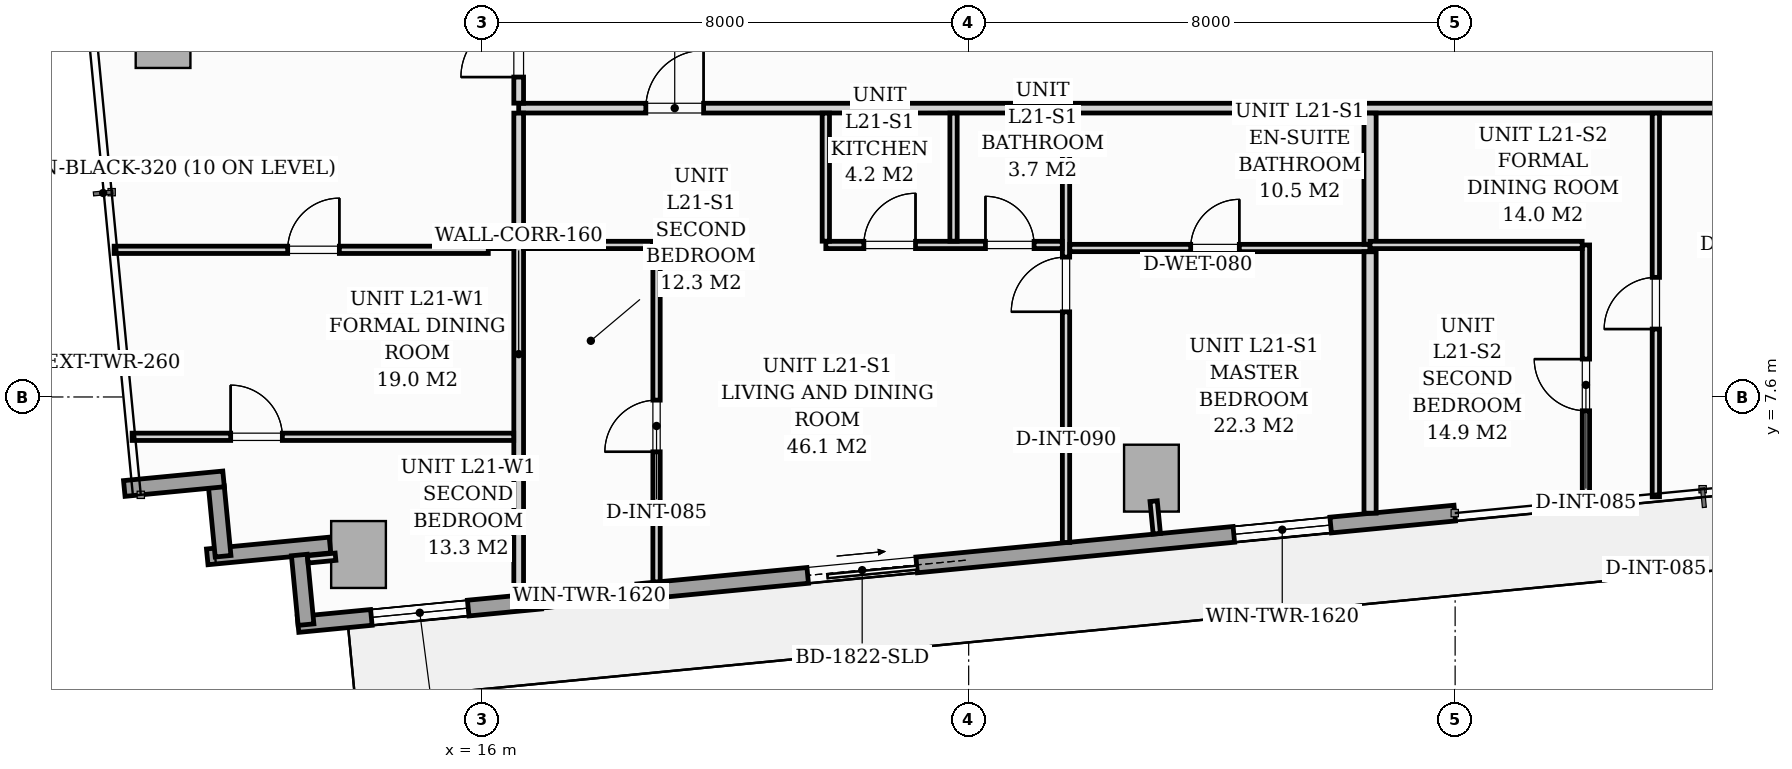
"""IFC4 building model, lengths in metres.
Left out: names, types, materials, properties, quantities, classifications, styles, units other than length and angle.
Written with IfcOpenShell. Run it as: python <this file> out.ifc"""

import sys

from ifc_helpers import new_model, si_unit, direction, frame, frame_2d, origin, origin_2d, place, context, subcontext, project, spatial, rectangle, extrude, source, transform, mapped, element, fill, save


model = new_model("IFC4")
c1 = context("Model", 3, precision=1e-05, world=origin(), true_north=direction((0.0, 1.0)))
c2 = subcontext(c1, "Body", "Model", "MODEL_VIEW")
j1 = project(units=[si_unit("LENGTHUNIT", "METRE"), si_unit("PLANEANGLEUNIT", "RADIAN")], contexts=[c1])
p1 = place(None, origin())
s1 = spatial("IfcSite", under=j1, at=p1, CompositionType="ELEMENT")
p2 = place(p1, origin())
s2 = spatial("IfcBuilding", under=s1, at=p2, CompositionType="ELEMENT")
p3 = place(p2, frame((0.0, 0.0, 77.8)))
s3 = spatial("IfcBuildingStorey", under=s2, at=p3, CompositionType="ELEMENT", Elevation=77.8)
m1 = source(origin(), c2, "Body", "SweptSolid", [
    extrude(rectangle(XDim=0.9, YDim=1.1, at=origin_2d()), origin(), (0.0, 0.0, 1.0), 3.194),
])
for number, where, z_axis, x_axis in (
    (1, (13.966, 5.01, 0.004), (0.0, 0.0, 1.0), (0.995, 0.096, 0.0)),
    (2, (27.006, 6.265, 0.004), (0.0, 0.0, 1.0), (0.995, 0.096, 0.0)),
    (3, (10.752, 13.561, 0.004), (0.0, 0.0, 1.0), (0.995, 0.096, 0.0)),
):
    element("IfcColumn", number, at=place(p3, frame(where, z_axis=z_axis, x_axis=x_axis)), inside=s3, PredefinedType="COLUMN", context=c2, shape_type="MappedRepresentation", body=[
        mapped(m1, transform((0.0, 0.0, 0.0), scale=1.0)),
    ])
p4 = place(p3, frame((13.497, 5.165, 0.0), z_axis=(0.0, 0.0, 1.0), x_axis=(-0.995386060643, -0.095950978511, 0.0)))
e4 = element("IfcWall", 4, at=p4, inside=s3, PredefinedType="STANDARD", context=c2, shape_type="SweptSolid", body=[
    extrude(rectangle(XDim=2.028, YDim=0.26, at=frame_2d((1.014, 0.0))), origin(), (0.0, 0.0, 1.0), 2.94),
])
p5 = place(p3, frame((11.739, 4.981, 0.0), z_axis=(0.0, 0.0, 1.0), x_axis=(-0.09576095695, 0.995404359607, 0.0)))
e5 = element("IfcWall", 5, at=p5, inside=s3, PredefinedType="STANDARD", context=c2, shape_type="SweptSolid", body=[
    extrude(rectangle(XDim=1.15, YDim=0.26, at=frame_2d((0.575, 0.0))), origin(), (0.0, 0.0, 1.0), 2.94),
])
p6 = place(p3, frame((11.747, 6.252, 0.0), z_axis=(0.0, 0.0, 1.0), x_axis=(-0.995394563142, -0.095862733462, 0.0)))
e6 = element("IfcWall", 6, at=p6, inside=s3, PredefinedType="STANDARD", context=c2, shape_type="SweptSolid", body=[
    extrude(rectangle(XDim=1.64, YDim=0.26, at=frame_2d((0.82, 0.0))), origin(), (0.0, 0.0, 1.0), 2.94),
])
p7 = place(p3, frame((31.994, 5.69, 0.0), z_axis=(0.0, 0.0, 1.0), x_axis=(-0.995396521236, -0.095842399342, 0.0)))
e7 = element("IfcWall", 7, at=p7, inside=s3, PredefinedType="STANDARD", context=c2, shape_type="SweptSolid", body=[
    extrude(rectangle(XDim=19.11, YDim=0.26, at=frame_2d((9.555, 0.0))), origin(), (0.0, 0.0, 1.0), 2.94),
])
p8 = place(p7, frame((8.89, 0.0, 0.0)))
e8 = element("IfcOpeningElement", 8, at=p8, cuts=e7, PredefinedType="OPENING", context=c2, shape_type="SweptSolid", body=[
    extrude(rectangle(XDim=1.8, YDim=2.06, at=frame_2d((0.9, 1.03))), frame((0.0, 0.14, 0.0), z_axis=(0.0, -1.0, 0.0), x_axis=(1.0, 0.0, 0.0)), (0.0, 0.0, 1.0), 0.28),
])
p9 = place(p7, frame((2.05, 0.0, 0.65)))
e9 = element("IfcOpeningElement", 9, at=p9, cuts=e7, PredefinedType="OPENING", context=c2, shape_type="SweptSolid", body=[
    extrude(rectangle(XDim=1.6, YDim=1.5, at=frame_2d((0.8, 0.75))), frame((0.0, 0.14, 0.0), z_axis=(0.0, -1.0, 0.0), x_axis=(1.0, 0.0, 0.0)), (0.0, 0.0, 1.0), 0.28),
])
p10 = place(p7, frame((13.499, 0.0, 0.75)))
e10 = element("IfcOpeningElement", 10, at=p10, cuts=e7, PredefinedType="OPENING", context=c2, shape_type="SweptSolid", body=[
    extrude(rectangle(XDim=1.6, YDim=1.5, at=frame_2d((0.8, 0.75))), frame((0.0, 0.14, 0.0), z_axis=(0.0, -1.0, 0.0), x_axis=(1.0, 0.0, 0.0)), (0.0, 0.0, 1.0), 0.28),
])
p11 = place(p7, frame((16.299, 0.0, 0.75)))
e11 = element("IfcOpeningElement", 11, at=p11, cuts=e7, PredefinedType="OPENING", context=c2, shape_type="SweptSolid", body=[
    extrude(rectangle(XDim=1.6, YDim=1.5, at=frame_2d((0.8, 0.75))), frame((0.0, 0.14, 0.0), z_axis=(0.0, -1.0, 0.0), x_axis=(1.0, 0.0, 0.0)), (0.0, 0.0, 1.0), 0.28),
])
p12 = place(p3, frame((13.103, 3.856, 0.0), z_axis=(0.0, 0.0, 1.0), x_axis=(-0.095951054827, 0.995386053287, 0.0)))
e12 = element("IfcWall", 12, at=p12, inside=s3, PredefinedType="STANDARD", context=c2, shape_type="SweptSolid", body=[
    extrude(rectangle(XDim=1.15, YDim=0.26, at=frame_2d((0.575, 0.0))), origin(), (0.0, 0.0, 1.0), 2.94),
])
p13 = place(p3, frame((16.6, 12.35, 0.0), z_axis=(0.0, 0.0, 1.0), x_axis=(1.0, 0.0, 0.0)))
e13 = element("IfcWall", 13, at=p13, inside=s3, PredefinedType="PARTITIONING", context=c2, shape_type="SweptSolid", body=[
    extrude(rectangle(XDim=37.6, YDim=0.16, at=frame_2d((18.8, 0.0))), origin(), (0.0, 0.0, 1.0), 2.94),
])
p14 = place(p13, frame((2.091, 0.0, 0.0)))
e14 = element("IfcOpeningElement", 14, at=p14, cuts=e13, PredefinedType="OPENING", context=c2, shape_type="SweptSolid", body=[
    extrude(rectangle(XDim=0.95, YDim=2.06, at=frame_2d((0.475, 1.03))), frame((0.0, 0.09, 0.0), z_axis=(0.0, -1.0, 0.0), x_axis=(1.0, 0.0, 0.0)), (0.0, 0.0, 1.0), 0.18),
])
p15 = place(p13, frame((26.146, 0.0, 0.0)))
e15 = element("IfcOpeningElement", 15, at=p15, cuts=e13, PredefinedType="OPENING", context=c2, shape_type="SweptSolid", body=[
    extrude(rectangle(XDim=0.95, YDim=2.06, at=frame_2d((0.475, 1.03))), frame((0.0, 0.09, 0.0), z_axis=(0.0, -1.0, 0.0), x_axis=(1.0, 0.0, 0.0)), (0.0, 0.0, 1.0), 0.18),
])
p16 = place(p3, frame((16.6, 4.341, 0.0), z_axis=(0.0, 0.0, 1.0), x_axis=(0.0, 1.0, 0.0)))
e16 = element("IfcWall", 16, at=p16, inside=s3, PredefinedType="PARTITIONING", context=c2, shape_type="SweptSolid", body=[
    extrude(rectangle(XDim=7.927, YDim=0.16, at=frame_2d((3.964, 0.0))), origin(), (0.0, 0.0, 1.0), 2.94),
])
p17 = place(p3, frame((16.6, 12.432, 0.0), z_axis=(0.0, 0.0, 1.0), x_axis=(0.0, 1.0, 0.0)))
e17 = element("IfcWall", 17, at=p17, inside=s3, PredefinedType="PARTITIONING", context=c2, shape_type="SweptSolid", body=[
    extrude(rectangle(XDim=11.475, YDim=0.16, at=frame_2d((5.738, 0.0))), origin(), (0.0, 0.0, 1.0), 2.94),
])
p18 = place(p17, frame((0.429, 0.0, 0.0)))
e18 = element("IfcOpeningElement", 18, at=p18, cuts=e17, PredefinedType="OPENING", context=c2, shape_type="SweptSolid", body=[
    extrude(rectangle(XDim=0.95, YDim=2.06, at=frame_2d((0.475, 1.03))), frame((0.0, 0.09, 0.0), z_axis=(0.0, -1.0, 0.0), x_axis=(1.0, 0.0, 0.0)), (0.0, 0.0, 1.0), 0.18),
])
p19 = place(p3, frame((25.601, 5.208, 0.0), z_axis=(0.0, 0.0, 1.0), x_axis=(0.0, 1.0, 0.0)))
e19 = element("IfcWall", 19, at=p19, inside=s3, PredefinedType="PARTITIONING", context=c2, shape_type="SweptSolid", body=[
    extrude(rectangle(XDim=7.061, YDim=0.12, at=frame_2d((3.53, 0.0))), origin(), (0.0, 0.0, 1.0), 2.94),
])
p20 = place(p19, frame((3.792, 0.0, 0.0)))
e20 = element("IfcOpeningElement", 20, at=p20, cuts=e19, PredefinedType="OPENING", context=c2, shape_type="SweptSolid", body=[
    extrude(rectangle(XDim=0.9, YDim=2.05, at=frame_2d((0.45, 1.025))), frame((0.0, 0.07, 0.0), z_axis=(0.0, -1.0, 0.0), x_axis=(1.0, 0.0, 0.0)), (0.0, 0.0, 1.0), 0.14),
])
p21 = place(p3, frame((21.651, 10.1, 0.0), z_axis=(0.0, 0.0, 1.0), x_axis=(1.0, 0.0, 0.0)))
e21 = element("IfcWall", 21, at=p21, inside=s3, PredefinedType="PARTITIONING", context=c2, shape_type="SweptSolid", body=[
    extrude(rectangle(XDim=3.888, YDim=0.12, at=frame_2d((1.944, 0.0))), origin(), (0.0, 0.0, 1.0), 2.94),
])
p22 = place(p21, frame((0.625, 0.0, 0.0)))
e22 = element("IfcOpeningElement", 22, at=p22, cuts=e21, PredefinedType="OPENING", context=c2, shape_type="SweptSolid", body=[
    extrude(rectangle(XDim=0.85, YDim=2.05, at=frame_2d((0.425, 1.025))), frame((0.0, 0.07, 0.0), z_axis=(0.0, -1.0, 0.0), x_axis=(1.0, 0.0, 0.0)), (0.0, 0.0, 1.0), 0.14),
])
p23 = place(p21, frame((2.625, 0.0, 0.0)))
e23 = element("IfcOpeningElement", 23, at=p23, cuts=e21, PredefinedType="OPENING", context=c2, shape_type="SweptSolid", body=[
    extrude(rectangle(XDim=0.8, YDim=2.02, at=frame_2d((0.4, 1.01))), frame((0.0, 0.07, 0.0), z_axis=(0.0, -1.0, 0.0), x_axis=(1.0, 0.0, 0.0)), (0.0, 0.0, 1.0), 0.14),
])
for number, where, z_axis, x_axis in (
    (24, (23.751, 10.162, 0.0), (0.0, 0.0, 1.0), (0.0, 1.0, 0.0)),
    (25, (21.651, 10.162, 0.0), (0.0, 0.0, 1.0), (0.0, 1.0, 0.0)),
):
    element("IfcWall", number, at=place(p3, frame(where, z_axis=z_axis, x_axis=x_axis)), inside=s3, PredefinedType="PARTITIONING", context=c2, shape_type="SweptSolid", body=[
        extrude(rectangle(XDim=2.106, YDim=0.12, at=frame_2d((1.053, 0.0))), origin(), (0.0, 0.0, 1.0), 2.94),
    ])
p24 = place(p3, frame((25.663, 10.05, 0.0), z_axis=(0.0, 0.0, 1.0), x_axis=(1.0, 0.0, 0.0)))
e26 = element("IfcWall", 26, at=p24, inside=s3, PredefinedType="PARTITIONING", context=c2, shape_type="SweptSolid", body=[
    extrude(rectangle(XDim=4.938, YDim=0.12, at=frame_2d((2.469, 0.0))), origin(), (0.0, 0.0, 1.0), 2.94),
])
p25 = place(p24, frame((1.988, 0.0, 0.0)))
e27 = element("IfcOpeningElement", 27, at=p25, cuts=e26, PredefinedType="OPENING", context=c2, shape_type="SweptSolid", body=[
    extrude(rectangle(XDim=0.8, YDim=2.02, at=frame_2d((0.4, 1.01))), frame((0.0, 0.07, 0.0), z_axis=(0.0, -1.0, 0.0), x_axis=(1.0, 0.0, 0.0)), (0.0, 0.0, 1.0), 0.14),
])
p26 = place(p3, frame((18.867, 4.559, 0.0), z_axis=(0.0, 0.0, 1.0), x_axis=(0.0, 1.0, 0.0)))
e28 = element("IfcWall", 28, at=p26, inside=s3, PredefinedType="PARTITIONING", context=c2, shape_type="SweptSolid", body=[
    extrude(rectangle(XDim=5.541, YDim=0.12, at=frame_2d((2.771, 0.0))), origin(), (0.0, 0.0, 1.0), 2.94),
])
p27 = place(p26, frame((2.139, 0.0, 0.0)))
e29 = element("IfcOpeningElement", 29, at=p27, cuts=e28, PredefinedType="OPENING", context=c2, shape_type="SweptSolid", body=[
    extrude(rectangle(XDim=0.85, YDim=2.05, at=frame_2d((0.425, 1.025))), frame((0.0, 0.07, 0.0), z_axis=(0.0, -1.0, 0.0), x_axis=(1.0, 0.0, 0.0)), (0.0, 0.0, 1.0), 0.14),
])
p28 = place(p3, frame((16.1, 10.1, 0.0), z_axis=(0.0, 0.0, 1.0), x_axis=(1.0, 0.0, 0.0)))
e30 = element("IfcWall", 30, at=p28, inside=s3, PredefinedType="PARTITIONING", context=c2, shape_type="SweptSolid", body=[
    extrude(rectangle(XDim=0.418, YDim=0.12, at=frame_2d((0.209, 0.0))), origin(), (0.0, 0.0, 1.0), 2.94),
])
p29 = place(p3, frame((16.682, 10.1, 0.0), z_axis=(0.0, 0.0, 1.0), x_axis=(1.0, 0.0, 0.0)))
e31 = element("IfcWall", 31, at=p29, inside=s3, PredefinedType="PARTITIONING", context=c2, shape_type="SweptSolid", body=[
    extrude(rectangle(XDim=2.123, YDim=0.12, at=frame_2d((1.062, 0.0))), origin(), (0.0, 0.0, 1.0), 2.94),
])
p30 = place(p3, frame((30.601, 5.689, 0.0), z_axis=(0.0, 0.0, 1.0), x_axis=(0.0, 1.0, 0.0)))
e32 = element("IfcWall", 32, at=p30, inside=s3, PredefinedType="PARTITIONING", context=c2, shape_type="SweptSolid", body=[
    extrude(rectangle(XDim=4.299, YDim=0.2, at=frame_2d((2.149, 0.0))), origin(), (0.0, 0.0, 1.0), 2.94),
])
p31 = place(p3, frame((30.601, 10.112, 0.0), z_axis=(0.0, 0.0, 1.0), x_axis=(0.0, 1.0, 0.0)))
e33 = element("IfcWall", 33, at=p31, inside=s3, PredefinedType="PARTITIONING", context=c2, shape_type="SweptSolid", body=[
    extrude(rectangle(XDim=2.156, YDim=0.2, at=frame_2d((1.078, 0.0))), origin(), (0.0, 0.0, 1.0), 2.94),
])
p32 = place(p3, frame((34.151, 5.848, 0.0), z_axis=(0.0, 0.0, 1.0), x_axis=(0.0, 1.0, 0.0)))
e34 = element("IfcWall", 34, at=p32, inside=s3, PredefinedType="PARTITIONING", context=c2, shape_type="SweptSolid", body=[
    extrude(rectangle(XDim=4.252, YDim=0.12, at=frame_2d((2.126, 0.0))), origin(), (0.0, 0.0, 1.0), 2.94),
])
p33 = place(p32, frame((1.525, 0.0, 0.0)))
e35 = element("IfcOpeningElement", 35, at=p33, cuts=e34, PredefinedType="OPENING", context=c2, shape_type="SweptSolid", body=[
    extrude(rectangle(XDim=0.85, YDim=2.05, at=frame_2d((0.425, 1.025))), frame((0.0, 0.07, 0.0), z_axis=(0.0, -1.0, 0.0), x_axis=(1.0, 0.0, 0.0)), (0.0, 0.0, 1.0), 0.14),
])
p34 = place(p3, frame((30.601, 10.1, 0.0), z_axis=(0.0, 0.0, 1.0), x_axis=(1.0, 0.0, 0.0)))
e36 = element("IfcWall", 36, at=p34, inside=s3, PredefinedType="PARTITIONING", context=c2, shape_type="SweptSolid", body=[
    extrude(rectangle(XDim=3.488, YDim=0.12, at=frame_2d((1.744, 0.0))), origin(), (0.0, 0.0, 1.0), 2.94),
])
p35 = place(p3, frame((35.301, 5.958, 0.0), z_axis=(0.0, 0.0, 1.0), x_axis=(0.0, 1.0, 0.0)))
e37 = element("IfcWall", 37, at=p35, inside=s3, PredefinedType="PARTITIONING", context=c2, shape_type="SweptSolid", body=[
    extrude(rectangle(XDim=6.31, YDim=0.12, at=frame_2d((3.155, 0.0))), origin(), (0.0, 0.0, 1.0), 2.94),
])
p36 = place(p35, frame((2.758, 0.0, 0.0)))
e38 = element("IfcOpeningElement", 38, at=p36, cuts=e37, PredefinedType="OPENING", context=c2, shape_type="SweptSolid", body=[
    extrude(rectangle(XDim=0.85, YDim=2.05, at=frame_2d((0.425, 1.025))), frame((0.0, 0.07, 0.0), z_axis=(0.0, -1.0, 0.0), x_axis=(1.0, 0.0, 0.0)), (0.0, 0.0, 1.0), 0.14),
])
p37 = place(p3, frame((10.243, 6.945, 0.0), z_axis=(0.0, 0.0, 1.0), x_axis=(1.0, 0.0, 0.0)))
e39 = element("IfcWall", 39, at=p37, inside=s3, PredefinedType="PARTITIONING", context=c2, shape_type="SweptSolid", body=[
    extrude(rectangle(XDim=6.275, YDim=0.12, at=frame_2d((3.137, 0.0))), origin(), (0.0, 0.0, 1.0), 2.94),
])
p38 = place(p37, frame((1.62, 0.0, 0.0)))
e40 = element("IfcOpeningElement", 40, at=p38, cuts=e39, PredefinedType="OPENING", context=c2, shape_type="SweptSolid", body=[
    extrude(rectangle(XDim=0.85, YDim=2.05, at=frame_2d((0.425, 1.025))), frame((0.0, 0.07, 0.0), z_axis=(0.0, -1.0, 0.0), x_axis=(1.0, 0.0, 0.0)), (0.0, 0.0, 1.0), 0.14),
])
p39 = place(p3, frame((9.947, 10.02, 0.0), z_axis=(0.0, 0.0, 1.0), x_axis=(1.0, 0.0, 0.0)))
e41 = element("IfcWall", 41, at=p39, inside=s3, PredefinedType="PARTITIONING", context=c2, shape_type="SweptSolid", body=[
    extrude(rectangle(XDim=6.153, YDim=0.12, at=frame_2d((3.076, 0.0))), origin(), (0.0, 0.0, 1.0), 2.94),
])
p40 = place(p39, frame((2.854, 0.0, 0.0)))
e42 = element("IfcOpeningElement", 42, at=p40, cuts=e41, PredefinedType="OPENING", context=c2, shape_type="SweptSolid", body=[
    extrude(rectangle(XDim=0.85, YDim=2.05, at=frame_2d((0.425, 1.025))), frame((0.0, 0.07, 0.0), z_axis=(0.0, -1.0, 0.0), x_axis=(1.0, 0.0, 0.0)), (0.0, 0.0, 1.0), 0.14),
])
p41 = place(p3, frame((13.588, 4.973, 0.0), z_axis=(0.0, 0.0, 1.0), x_axis=(-0.995435366701, -0.095438098896, 0.0)))
e43 = element("IfcWall", 43, at=p41, inside=s3, PredefinedType="PARTITIONING", context=c2, shape_type="SweptSolid", body=[
    extrude(rectangle(XDim=0.458, YDim=0.12, at=frame_2d((0.229, 0.0))), origin(), (0.0, 0.0, 1.0), 2.94),
])
p42 = place(p3, frame((27.042, 5.887, 0.0), z_axis=(0.0, 0.0, 1.0), x_axis=(0.096222656154, -0.995359834654, 0.0)))
e44 = element("IfcWall", 44, at=p42, inside=s3, PredefinedType="PARTITIONING", context=c2, shape_type="SweptSolid", body=[
    extrude(rectangle(XDim=0.538, YDim=0.12, at=frame_2d((0.269, 0.0))), origin(), (0.0, 0.0, 1.0), 2.94),
])
m2 = source(origin(), c2, "Body", "SweptSolid", [
    extrude(rectangle(XDim=1.8, YDim=2.06, at=frame_2d((0.9, 1.03))), frame((0.0, 0.025, 0.0), z_axis=(0.0, -1.0, 0.0), x_axis=(1.0, 0.0, 0.0)), (0.0, 0.0, 1.0), 0.05),
])
p43 = place(p8, origin())
e45 = element("IfcDoor", 45, at=p43, inside=s3, OperationType="SLIDING_TO_LEFT", PredefinedType="DOOR", context=c2, shape_type="MappedRepresentation", body=[
    mapped(m2, transform((0.0, 0.0, 0.0), scale=1.0)),
])
fill(e8, e45)
m3 = source(origin(), c2, "Body", "SweptSolid", [
    extrude(rectangle(XDim=1.6, YDim=1.5, at=frame_2d((0.8, 0.75))), frame((0.0, 0.03, 0.0), z_axis=(0.0, -1.0, 0.0), x_axis=(1.0, 0.0, 0.0)), (0.0, 0.0, 1.0), 0.06),
])
p44 = place(p9, origin())
e46 = element("IfcWindow", 46, at=p44, inside=s3, PartitioningType="SINGLE_PANEL", PredefinedType="WINDOW", context=c2, shape_type="MappedRepresentation", body=[
    mapped(m3, transform((0.0, 0.0, 0.0), scale=1.0)),
])
fill(e9, e46)
p45 = place(p10, origin())
e47 = element("IfcWindow", 47, at=p45, inside=s3, PartitioningType="SINGLE_PANEL", PredefinedType="WINDOW", context=c2, shape_type="MappedRepresentation", body=[
    mapped(m3, transform((0.0, 0.0, 0.0), scale=1.0)),
])
fill(e10, e47)
p46 = place(p11, origin())
e48 = element("IfcWindow", 48, at=p46, inside=s3, PartitioningType="SINGLE_PANEL", PredefinedType="WINDOW", context=c2, shape_type="MappedRepresentation", body=[
    mapped(m3, transform((0.0, 0.0, 0.0), scale=1.0)),
])
fill(e11, e48)
m4 = source(origin(), c2, "Body", "SweptSolid", [
    extrude(rectangle(XDim=0.8, YDim=2.02, at=frame_2d((0.4, 1.01))), frame((0.0, 0.025, 0.0), z_axis=(0.0, -1.0, 0.0), x_axis=(1.0, 0.0, 0.0)), (0.0, 0.0, 1.0), 0.05),
])
p47 = place(p25, origin())
e49 = element("IfcDoor", 49, at=p47, inside=s3, OperationType="SINGLE_SWING_RIGHT", PredefinedType="DOOR", context=c2, shape_type="MappedRepresentation", body=[
    mapped(m4, transform((0.0, 0.0, 0.0), scale=1.0)),
])
fill(e27, e49)
m5 = source(origin(), c2, "Body", "SweptSolid", [
    extrude(rectangle(XDim=0.85, YDim=2.05, at=frame_2d((0.425, 1.025))), frame((0.0, 0.025, 0.0), z_axis=(0.0, -1.0, 0.0), x_axis=(1.0, 0.0, 0.0)), (0.0, 0.0, 1.0), 0.05),
])
p48 = place(p27, origin())
e50 = element("IfcDoor", 50, at=p48, inside=s3, OperationType="SINGLE_SWING_LEFT", PredefinedType="DOOR", context=c2, shape_type="MappedRepresentation", body=[
    mapped(m5, transform((0.0, 0.0, 0.0), scale=1.0)),
])
fill(e29, e50)
m6 = source(origin(), c2, "Body", "SweptSolid", [
    extrude(rectangle(XDim=0.95, YDim=2.06, at=frame_2d((0.475, 1.03))), frame((0.0, 0.025, 0.0), z_axis=(0.0, -1.0, 0.0), x_axis=(1.0, 0.0, 0.0)), (0.0, 0.0, 1.0), 0.05),
])
p49 = place(p14, origin())
e51 = element("IfcDoor", 51, at=p49, inside=s3, OperationType="SINGLE_SWING_RIGHT", PredefinedType="DOOR", context=c2, shape_type="MappedRepresentation", body=[
    mapped(m6, transform((0.0, 0.0, 0.0), scale=1.0)),
])
fill(e14, e51)
m7 = source(origin(), c2, "Body", "SweptSolid", [
    extrude(rectangle(XDim=0.9, YDim=2.05, at=frame_2d((0.45, 1.025))), frame((0.0, 0.025, 0.0), z_axis=(0.0, -1.0, 0.0), x_axis=(1.0, 0.0, 0.0)), (0.0, 0.0, 1.0), 0.05),
])
p50 = place(p20, origin())
e52 = element("IfcDoor", 52, at=p50, inside=s3, OperationType="SINGLE_SWING_LEFT", PredefinedType="DOOR", context=c2, shape_type="MappedRepresentation", body=[
    mapped(m7, transform((0.0, 0.0, 0.0), scale=1.0)),
])
fill(e20, e52)
p51 = place(p22, origin())
e53 = element("IfcDoor", 53, at=p51, inside=s3, OperationType="SINGLE_SWING_RIGHT", PredefinedType="DOOR", context=c2, shape_type="MappedRepresentation", body=[
    mapped(m5, transform((0.0, 0.0, 0.0), scale=1.0)),
])
fill(e22, e53)
p52 = place(p23, origin())
e54 = element("IfcDoor", 54, at=p52, inside=s3, OperationType="SINGLE_SWING_LEFT", PredefinedType="DOOR", context=c2, shape_type="MappedRepresentation", body=[
    mapped(m4, transform((0.0, 0.0, 0.0), scale=1.0)),
])
fill(e23, e54)
p53 = place(p33, origin())
e55 = element("IfcDoor", 55, at=p53, inside=s3, OperationType="SINGLE_SWING_RIGHT", PredefinedType="DOOR", context=c2, shape_type="MappedRepresentation", body=[
    mapped(m5, transform((0.0, 0.0, 0.0), scale=1.0)),
])
fill(e35, e55)
p54 = place(p36, origin())
e56 = element("IfcDoor", 56, at=p54, inside=s3, OperationType="SINGLE_SWING_LEFT", PredefinedType="DOOR", context=c2, shape_type="MappedRepresentation", body=[
    mapped(m5, transform((0.0, 0.0, 0.0), scale=1.0)),
])
fill(e38, e56)
p55 = place(p18, origin())
e57 = element("IfcDoor", 57, at=p55, inside=s3, OperationType="SINGLE_SWING_LEFT", PredefinedType="DOOR", context=c2, shape_type="MappedRepresentation", body=[
    mapped(m6, transform((0.0, 0.0, 0.0), scale=1.0)),
])
fill(e18, e57)
p56 = place(p38, origin())
e58 = element("IfcDoor", 58, at=p56, inside=s3, OperationType="SINGLE_SWING_LEFT", PredefinedType="DOOR", context=c2, shape_type="MappedRepresentation", body=[
    mapped(m5, transform((0.0, 0.0, 0.0), scale=1.0)),
])
fill(e40, e58)
p57 = place(p40, origin())
e59 = element("IfcDoor", 59, at=p57, inside=s3, OperationType="SINGLE_SWING_RIGHT", PredefinedType="DOOR", context=c2, shape_type="MappedRepresentation", body=[
    mapped(m5, transform((0.0, 0.0, 0.0), scale=1.0)),
])
fill(e42, e59)
save(model, sys.argv[1])
